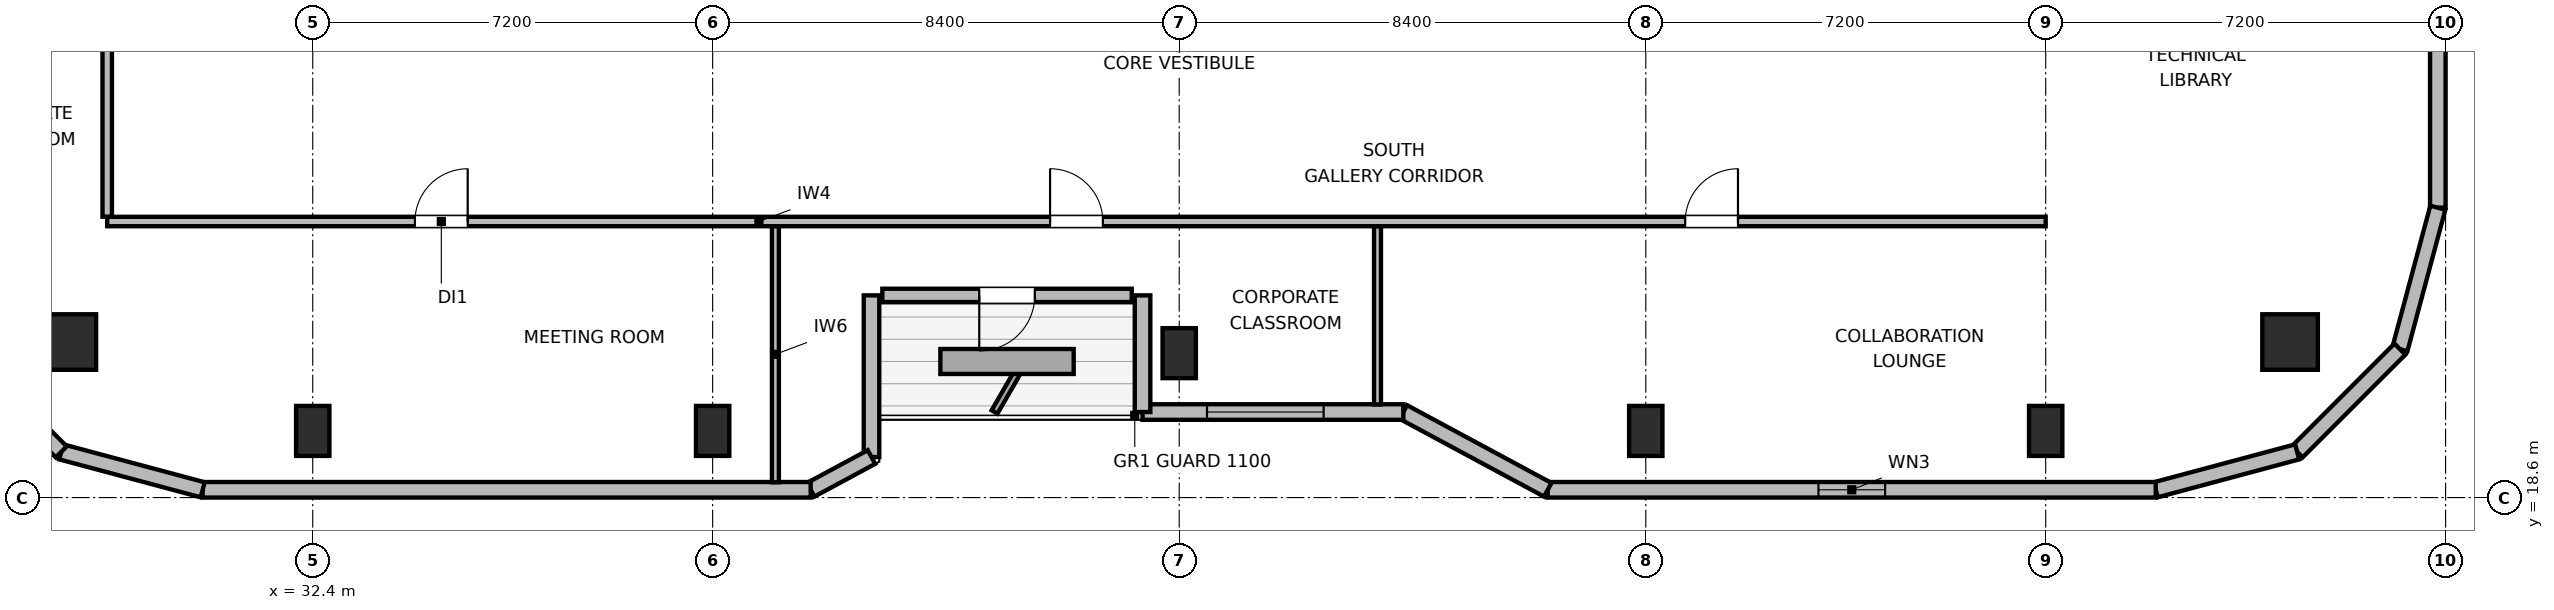
"""IFC4 building model, lengths in metres.
Left out: names, types, materials, properties, quantities, classifications, styles, units other than length and angle.
Written with IfcOpenShell. Run it as: python <this file> out.ifc"""

import sys

from ifc_helpers import new_model, si_unit, direction, frame, frame_2d, origin, origin_2d, place, context, subcontext, project, spatial, rectangle, circle, extrude, element, fill, save


model = new_model("IFC4")
c1 = context("Model", 3, precision=1e-05, world=origin(), true_north=direction((0.0, 1.0)))
c2 = subcontext(c1, "Body", "Model", "MODEL_VIEW")
j1 = project(units=[si_unit("LENGTHUNIT", "METRE"), si_unit("PLANEANGLEUNIT", "RADIAN")], contexts=[c1])
p1 = place(None, origin())
s1 = spatial("IfcSite", under=j1, at=p1, CompositionType="ELEMENT")
p2 = place(p1, origin())
s2 = spatial("IfcBuilding", under=s1, at=p2, CompositionType="ELEMENT")
p3 = place(p2, frame((0.0, 0.0, 223.2)))
s3 = spatial("IfcBuildingStorey", under=s2, at=p3, CompositionType="ELEMENT", Elevation=223.2)
for number, where, z_axis, x_axis in (
    (1, (28.0, 21.4, 0.0), (0.0, 0.0, 1.0), (1.0, 0.0, 0.0)),
    (2, (68.0, 21.4, 0.0), (0.0, 0.0, 1.0), (1.0, 0.0, 0.0)),
):
    element("IfcColumn", number, at=place(p3, frame(where, z_axis=z_axis, x_axis=x_axis)), inside=s3, PredefinedType="COLUMN", context=c2, shape_type="SweptSolid", body=[
        extrude(circle(Radius=0.5, at=origin_2d()), origin(), (0.0, 0.0, 1.0), 3.9),
    ])
for number, where, z_axis, x_axis in (
    (3, (32.4, 19.8, 0.0), (0.0, 0.0, 1.0), (1.0, 0.0, 0.0)),
    (4, (39.6, 19.8, 0.0), (0.0, 0.0, 1.0), (1.0, 0.0, 0.0)),
    (5, (48.0, 21.2, 0.0), (0.0, 0.0, 1.0), (1.0, 0.0, 0.0)),
    (6, (56.4, 19.8, 0.0), (0.0, 0.0, 1.0), (1.0, 0.0, 0.0)),
    (7, (63.6, 19.8, 0.0), (0.0, 0.0, 1.0), (1.0, 0.0, 0.0)),
):
    element("IfcColumn", number, at=place(p3, frame(where, z_axis=z_axis, x_axis=x_axis)), inside=s3, PredefinedType="COLUMN", context=c2, shape_type="SweptSolid", body=[
        extrude(rectangle(XDim=0.6, YDim=0.9, at=origin_2d()), origin(), (0.0, 0.0, 1.0), 3.9),
    ])
p4 = place(p3, frame((70.66, 37.66, 0.0), z_axis=(0.0, 0.0, 1.0), x_axis=(0.0, -1.0, 0.0)))
e8 = element("IfcWall", 8, at=p4, inside=s3, PredefinedType="SOLIDWALL", context=c2, shape_type="SweptSolid", body=[
    extrude(rectangle(XDim=13.842, YDim=0.28, at=frame_2d((6.921, 0.0))), origin(), (0.0, 0.0, 1.0), 3.68),
])
p5 = place(p4, frame((8.346, 0.0, 0.85)))
e9 = element("IfcOpeningElement", 9, at=p5, cuts=e8, PredefinedType="OPENING", context=c2, shape_type="SweptSolid", body=[
    extrude(rectangle(XDim=2.1, YDim=1.05, at=frame_2d((1.05, 0.525))), frame((0.0, 0.15, 0.0), z_axis=(0.0, -1.0, 0.0), x_axis=(1.0, 0.0, 0.0)), (0.0, 0.0, 1.0), 0.3),
])
p6 = place(p3, frame((70.66, 23.818, 0.0), z_axis=(0.0, 0.0, 1.0), x_axis=(-0.2588904131, -0.965906700466, 0.0)))
e10 = element("IfcWall", 10, at=p6, inside=s3, PredefinedType="SOLIDWALL", context=c2, shape_type="SweptSolid", body=[
    extrude(rectangle(XDim=2.636, YDim=0.28, at=frame_2d((1.318, 0.0))), origin(), (0.0, 0.0, 1.0), 3.68),
])
p7 = place(p3, frame((69.978, 21.272, 0.0), z_axis=(0.0, 0.0, 1.0), x_axis=(-0.707153437963, -0.707060121331, 0.0)))
e11 = element("IfcWall", 11, at=p7, inside=s3, PredefinedType="SOLIDWALL", context=c2, shape_type="SweptSolid", body=[
    extrude(rectangle(XDim=2.616, YDim=0.28, at=frame_2d((1.308, 0.0))), origin(), (0.0, 0.0, 1.0), 3.68),
])
p8 = place(p3, frame((68.127, 19.423, 0.0), z_axis=(0.0, 0.0, 1.0), x_axis=(-0.965883534663, -0.258976828051, 0.0)))
e12 = element("IfcWall", 12, at=p8, inside=s3, PredefinedType="SOLIDWALL", context=c2, shape_type="SweptSolid", body=[
    extrude(rectangle(XDim=2.636, YDim=0.28, at=frame_2d((1.318, 0.0))), origin(), (0.0, 0.0, 1.0), 3.68),
])
p9 = place(p3, frame((65.582, 18.74, 0.0), z_axis=(0.0, 0.0, 1.0), x_axis=(-1.0, 0.0, 0.0)))
e13 = element("IfcWall", 13, at=p9, inside=s3, PredefinedType="SOLIDWALL", context=c2, shape_type="SweptSolid", body=[
    extrude(rectangle(XDim=10.946, YDim=0.28, at=frame_2d((5.473, 0.0))), origin(), (0.0, 0.0, 1.0), 3.68),
])
p10 = place(p9, frame((4.873, 0.0, 0.85)))
e14 = element("IfcOpeningElement", 14, at=p10, cuts=e13, PredefinedType="OPENING", context=c2, shape_type="SweptSolid", body=[
    extrude(rectangle(XDim=1.2, YDim=1.1, at=frame_2d((0.6, 0.55))), frame((0.0, 0.15, 0.0), z_axis=(0.0, -1.0, 0.0), x_axis=(1.0, 0.0, 0.0)), (0.0, 0.0, 1.0), 0.3),
])
p11 = place(p3, frame((54.635, 18.74, 0.0), z_axis=(0.0, 0.0, 1.0), x_axis=(-0.880473754814, 0.474094892488, 0.0)))
e15 = element("IfcWall", 15, at=p11, inside=s3, PredefinedType="SOLIDWALL", context=c2, shape_type="SweptSolid", body=[
    extrude(rectangle(XDim=2.953, YDim=0.28, at=frame_2d((1.477, 0.0))), origin(), (0.0, 0.0, 1.0), 2.265),
])
p12 = place(p3, frame((52.035, 20.14, 0.0), z_axis=(0.0, 0.0, 1.0), x_axis=(-1.0, 0.0, 0.0)))
e16 = element("IfcWall", 16, at=p12, inside=s3, PredefinedType="SOLIDWALL", context=c2, shape_type="SweptSolid", body=[
    extrude(rectangle(XDim=4.695, YDim=0.28, at=frame_2d((2.348, 0.0))), origin(), (0.0, 0.0, 1.0), 2.265),
])
p13 = place(p12, frame((1.435, 0.0, 0.85)))
e17 = element("IfcOpeningElement", 17, at=p13, cuts=e16, PredefinedType="OPENING", context=c2, shape_type="SweptSolid", body=[
    extrude(rectangle(XDim=2.1, YDim=1.05, at=frame_2d((1.05, 0.525))), frame((0.0, 0.15, 0.0), z_axis=(0.0, -1.0, 0.0), x_axis=(1.0, 0.0, 0.0)), (0.0, 0.0, 1.0), 0.3),
])
p14 = place(p3, frame((47.34, 20.14, 0.0), z_axis=(0.0, 0.0, 1.0), x_axis=(0.0, 1.0, 0.0)))
e18 = element("IfcWall", 18, at=p14, inside=s3, PredefinedType="SOLIDWALL", context=c2, shape_type="SweptSolid", body=[
    extrude(rectangle(XDim=2.1, YDim=0.28, at=frame_2d((1.05, 0.0))), origin(), (0.0, 0.0, 1.0), 2.265),
])
p15 = place(p3, frame((47.145, 22.24, 0.0), z_axis=(0.0, 0.0, 1.0), x_axis=(-1.0, 0.0, 0.0)))
e19 = element("IfcWall", 19, at=p15, inside=s3, PredefinedType="SOLIDWALL", context=c2, shape_type="SweptSolid", body=[
    extrude(rectangle(XDim=4.49, YDim=0.24, at=frame_2d((2.245, 0.0))), origin(), (0.0, 0.0, 1.0), 3.68),
])
p16 = place(p15, frame((1.745, 0.0, 0.0)))
e20 = element("IfcOpeningElement", 20, at=p16, cuts=e19, PredefinedType="OPENING", context=c2, shape_type="SweptSolid", body=[
    extrude(rectangle(XDim=1.0, YDim=2.02, at=frame_2d((0.5, 1.01))), frame((0.0, 0.13, 0.0), z_axis=(0.0, -1.0, 0.0), x_axis=(1.0, 0.0, 0.0)), (0.0, 0.0, 1.0), 0.26),
])
p17 = place(p3, frame((42.46, 22.24, 0.0), z_axis=(0.0, 0.0, 1.0), x_axis=(0.0, -1.0, 0.0)))
e21 = element("IfcWall", 21, at=p17, inside=s3, PredefinedType="SOLIDWALL", context=c2, shape_type="SweptSolid", body=[
    extrude(rectangle(XDim=2.91, YDim=0.28, at=frame_2d((1.455, 0.0))), origin(), (0.0, 0.0, 1.0), 2.265),
])
p18 = place(p3, frame((42.46, 19.33, 0.0), z_axis=(0.0, 0.0, 1.0), x_axis=(-0.880515214249, -0.474017887296, 0.0)))
e22 = element("IfcWall", 22, at=p18, inside=s3, PredefinedType="SOLIDWALL", context=c2, shape_type="SweptSolid", body=[
    extrude(rectangle(XDim=1.244, YDim=0.28, at=frame_2d((0.622, 0.0))), origin(), (0.0, 0.0, 1.0), 3.68),
])
p19 = place(p3, frame((41.365, 18.74, 0.0), z_axis=(0.0, 0.0, 1.0), x_axis=(-1.0, 0.0, 0.0)))
e23 = element("IfcWall", 23, at=p19, inside=s3, PredefinedType="SOLIDWALL", context=c2, shape_type="SweptSolid", body=[
    extrude(rectangle(XDim=10.946, YDim=0.28, at=frame_2d((5.473, 0.0))), origin(), (0.0, 0.0, 1.0), 3.68),
])
p20 = place(p3, frame((30.418, 18.74, 0.0), z_axis=(0.0, 0.0, 1.0), x_axis=(-0.965883534663, 0.258976828051, 0.0)))
e24 = element("IfcWall", 24, at=p20, inside=s3, PredefinedType="SOLIDWALL", context=c2, shape_type="SweptSolid", body=[
    extrude(rectangle(XDim=2.636, YDim=0.28, at=frame_2d((1.318, 0.0))), origin(), (0.0, 0.0, 1.0), 3.68),
])
p21 = place(p3, frame((27.873, 19.423, 0.0), z_axis=(0.0, 0.0, 1.0), x_axis=(-0.707153437963, 0.707060121331, 0.0)))
e25 = element("IfcWall", 25, at=p21, inside=s3, PredefinedType="SOLIDWALL", context=c2, shape_type="SweptSolid", body=[
    extrude(rectangle(XDim=2.616, YDim=0.28, at=frame_2d((1.308, 0.0))), origin(), (0.0, 0.0, 1.0), 3.68),
])
p22 = place(p3, frame((28.7, 23.57, 0.0), z_axis=(0.0, 0.0, 1.0), x_axis=(1.0, 0.0, 0.0)))
e26 = element("IfcWall", 26, at=p22, inside=s3, PredefinedType="PARTITIONING", context=c2, shape_type="SweptSolid", body=[
    extrude(rectangle(XDim=34.9, YDim=0.17, at=frame_2d((17.45, 0.0))), origin(), (0.0, 0.0, 1.0), 3.68),
])
p23 = place(p22, frame((5.54, 0.0, 0.0)))
e27 = element("IfcOpeningElement", 27, at=p23, cuts=e26, PredefinedType="OPENING", context=c2, shape_type="SweptSolid", body=[
    extrude(rectangle(XDim=0.95, YDim=2.04, at=frame_2d((0.475, 1.02))), frame((0.0, 0.095, 0.0), z_axis=(0.0, -1.0, 0.0), x_axis=(1.0, 0.0, 0.0)), (0.0, 0.0, 1.0), 0.19),
])
p24 = place(p22, frame((16.975, 0.0, 0.0)))
e28 = element("IfcOpeningElement", 28, at=p24, cuts=e26, PredefinedType="OPENING", context=c2, shape_type="SweptSolid", body=[
    extrude(rectangle(XDim=0.95, YDim=2.04, at=frame_2d((0.475, 1.02))), frame((0.0, 0.095, 0.0), z_axis=(0.0, -1.0, 0.0), x_axis=(1.0, 0.0, 0.0)), (0.0, 0.0, 1.0), 0.19),
])
p25 = place(p22, frame((28.41, 0.0, 0.0)))
e29 = element("IfcOpeningElement", 29, at=p25, cuts=e26, PredefinedType="OPENING", context=c2, shape_type="SweptSolid", body=[
    extrude(rectangle(XDim=0.95, YDim=2.04, at=frame_2d((0.475, 1.02))), frame((0.0, 0.095, 0.0), z_axis=(0.0, -1.0, 0.0), x_axis=(1.0, 0.0, 0.0)), (0.0, 0.0, 1.0), 0.19),
])
p26 = place(p3, frame((28.7, 23.657, 0.0), z_axis=(0.0, 0.0, 1.0), x_axis=(0.0, 1.0, 0.0)))
e30 = element("IfcWall", 30, at=p26, inside=s3, PredefinedType="PARTITIONING", context=c2, shape_type="SweptSolid", body=[
    extrude(rectangle(XDim=24.686, YDim=0.17, at=frame_2d((12.343, 0.0))), origin(), (0.0, 0.0, 1.0), 3.68),
])
p27 = place(p26, frame((4.353, 0.0, 0.0)))
e31 = element("IfcOpeningElement", 31, at=p27, cuts=e30, PredefinedType="OPENING", context=c2, shape_type="SweptSolid", body=[
    extrude(rectangle(XDim=0.95, YDim=2.04, at=frame_2d((0.475, 1.02))), frame((0.0, 0.095, 0.0), z_axis=(0.0, -1.0, 0.0), x_axis=(1.0, 0.0, 0.0)), (0.0, 0.0, 1.0), 0.19),
])
p28 = place(p26, frame((12.468, 0.0, 0.0)))
e32 = element("IfcOpeningElement", 32, at=p28, cuts=e30, PredefinedType="OPENING", context=c2, shape_type="SweptSolid", body=[
    extrude(rectangle(XDim=0.95, YDim=2.04, at=frame_2d((0.475, 1.02))), frame((0.0, 0.095, 0.0), z_axis=(0.0, -1.0, 0.0), x_axis=(1.0, 0.0, 0.0)), (0.0, 0.0, 1.0), 0.19),
])
p29 = place(p26, frame((19.983, 0.0, 0.0)))
e33 = element("IfcOpeningElement", 33, at=p29, cuts=e30, PredefinedType="OPENING", context=c2, shape_type="SweptSolid", body=[
    extrude(rectangle(XDim=0.95, YDim=2.04, at=frame_2d((0.475, 1.02))), frame((0.0, 0.095, 0.0), z_axis=(0.0, -1.0, 0.0), x_axis=(1.0, 0.0, 0.0)), (0.0, 0.0, 1.0), 0.19),
])
p30 = place(p3, frame((40.73, 18.875, 0.0), z_axis=(0.0, 0.0, 1.0), x_axis=(0.0, 1.0, 0.0)))
e34 = element("IfcWall", 34, at=p30, inside=s3, PredefinedType="PARTITIONING", context=c2, shape_type="SweptSolid", body=[
    extrude(rectangle(XDim=4.608, YDim=0.125, at=frame_2d((2.304, 0.0))), origin(), (0.0, 0.0, 1.0), 3.043),
])
p31 = place(p3, frame((51.57, 20.275, 0.0), z_axis=(0.0, 0.0, 1.0), x_axis=(0.0, 1.0, 0.0)))
e35 = element("IfcWall", 35, at=p31, inside=s3, PredefinedType="PARTITIONING", context=c2, shape_type="SweptSolid", body=[
    extrude(rectangle(XDim=3.208, YDim=0.125, at=frame_2d((1.604, 0.0))), origin(), (0.0, 0.0, 1.0), 3.68),
])
p32 = place(p10, origin())
e36 = element("IfcWindow", 36, at=p32, inside=s3, PartitioningType="SINGLE_PANEL", PredefinedType="WINDOW", context=c2, shape_type="SweptSolid", body=[
    extrude(rectangle(XDim=1.2, YDim=1.1, at=frame_2d((0.6, 0.55))), frame((0.0, 0.03, 0.0), z_axis=(0.0, -1.0, 0.0), x_axis=(1.0, 0.0, 0.0)), (0.0, 0.0, 1.0), 0.06),
])
fill(e14, e36)
p33 = place(p13, origin())
e37 = element("IfcWindow", 37, at=p33, inside=s3, PartitioningType="SINGLE_PANEL", PredefinedType="WINDOW", context=c2, shape_type="SweptSolid", body=[
    extrude(rectangle(XDim=2.1, YDim=1.05, at=frame_2d((1.05, 0.525))), frame((0.0, 0.03, 0.0), z_axis=(0.0, -1.0, 0.0), x_axis=(1.0, 0.0, 0.0)), (0.0, 0.0, 1.0), 0.06),
])
fill(e17, e37)
p34 = place(p16, origin())
e38 = element("IfcDoor", 38, at=p34, inside=s3, OperationType="SINGLE_SWING_RIGHT", PredefinedType="DOOR", context=c2, shape_type="SweptSolid", body=[
    extrude(rectangle(XDim=1.0, YDim=2.02, at=frame_2d((0.5, 1.01))), frame((0.0, 0.025, 0.0), z_axis=(0.0, -1.0, 0.0), x_axis=(1.0, 0.0, 0.0)), (0.0, 0.0, 1.0), 0.05),
])
fill(e20, e38)
p35 = place(p23, origin())
e39 = element("IfcDoor", 39, at=p35, inside=s3, OperationType="SINGLE_SWING_RIGHT", PredefinedType="DOOR", context=c2, shape_type="SweptSolid", body=[
    extrude(rectangle(XDim=0.95, YDim=2.04, at=frame_2d((0.475, 1.02))), frame((0.0, 0.025, 0.0), z_axis=(0.0, -1.0, 0.0), x_axis=(1.0, 0.0, 0.0)), (0.0, 0.0, 1.0), 0.05),
])
fill(e27, e39)
p36 = place(p24, origin())
e40 = element("IfcDoor", 40, at=p36, inside=s3, OperationType="SINGLE_SWING_LEFT", PredefinedType="DOOR", context=c2, shape_type="SweptSolid", body=[
    extrude(rectangle(XDim=0.95, YDim=2.04, at=frame_2d((0.475, 1.02))), frame((0.0, 0.025, 0.0), z_axis=(0.0, -1.0, 0.0), x_axis=(1.0, 0.0, 0.0)), (0.0, 0.0, 1.0), 0.05),
])
fill(e28, e40)
p37 = place(p25, origin())
e41 = element("IfcDoor", 41, at=p37, inside=s3, OperationType="SINGLE_SWING_RIGHT", PredefinedType="DOOR", context=c2, shape_type="SweptSolid", body=[
    extrude(rectangle(XDim=0.95, YDim=2.04, at=frame_2d((0.475, 1.02))), frame((0.0, 0.025, 0.0), z_axis=(0.0, -1.0, 0.0), x_axis=(1.0, 0.0, 0.0)), (0.0, 0.0, 1.0), 0.05),
])
fill(e29, e41)
save(model, sys.argv[1])
